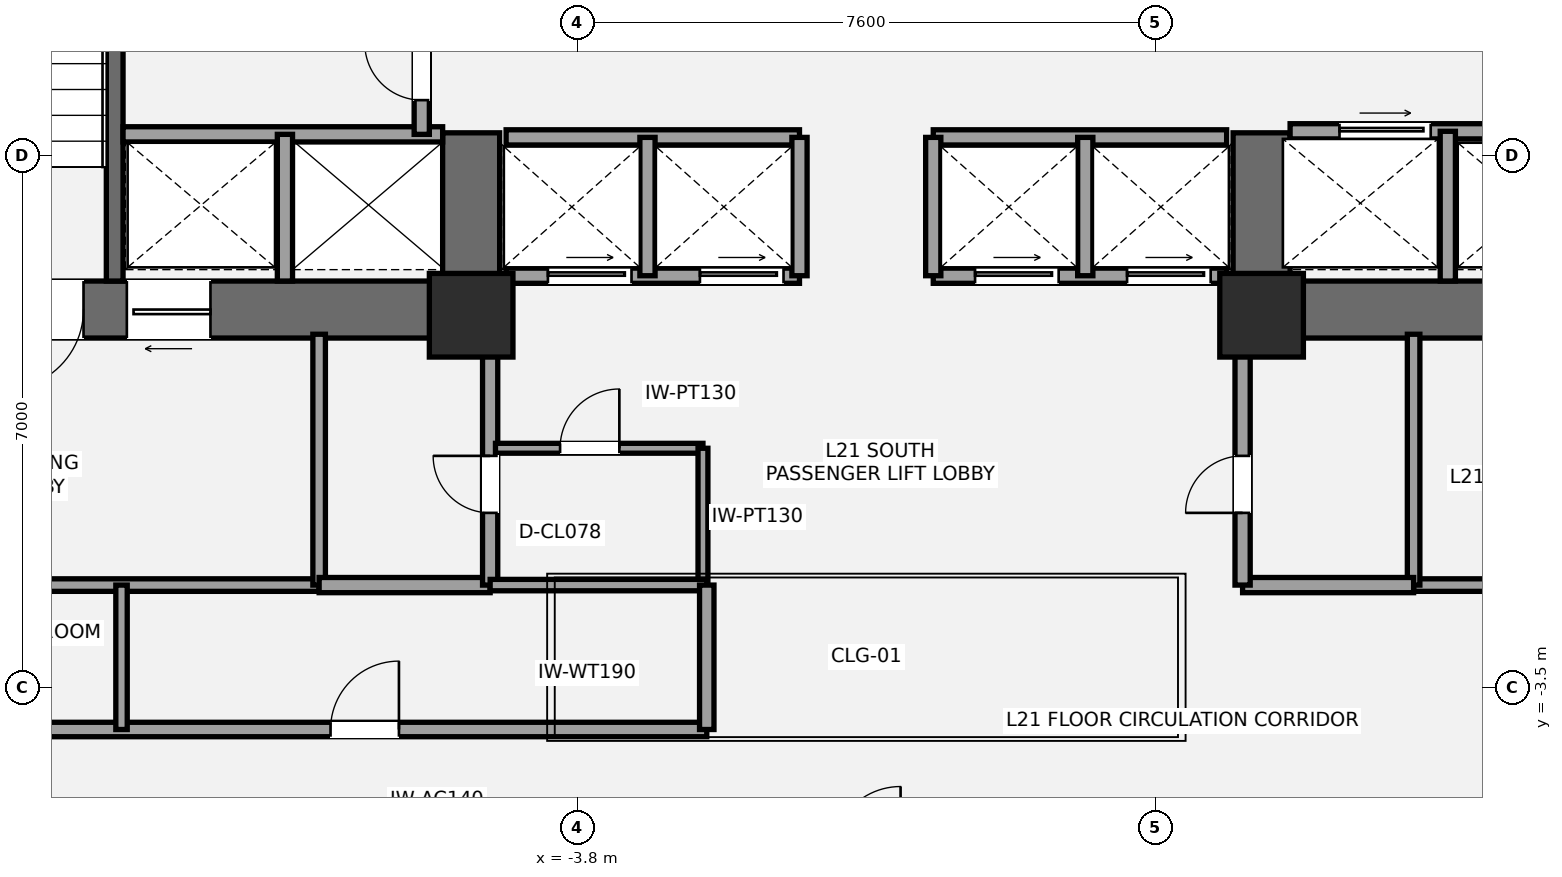
"""IFC4 building model, lengths in metres.
Left out: names, types, materials, properties, quantities, classifications, styles, units other than length and angle.
Written with IfcOpenShell. Run it as: python <this file> out.ifc"""

import sys

from ifc_helpers import new_model, si_unit, direction, frame, frame_2d, origin, origin_2d, place, context, subcontext, project, spatial, rectangle, extrude, element, fill, save


model = new_model("IFC4")
c1 = context("Model", 3, precision=1e-05, world=origin(), true_north=direction((0.0, 1.0)))
c2 = subcontext(c1, "Body", "Model", "MODEL_VIEW")
j1 = project(units=[si_unit("LENGTHUNIT", "METRE"), si_unit("PLANEANGLEUNIT", "RADIAN")], contexts=[c1])
p1 = place(None, origin())
s1 = spatial("IfcSite", under=j1, at=p1, CompositionType="ELEMENT")
p2 = place(p1, origin())
s2 = spatial("IfcBuilding", under=s1, at=p2, CompositionType="ELEMENT")
p3 = place(p2, frame((0.0, 0.0, 81.9)))
s3 = spatial("IfcBuildingStorey", under=s2, at=p3, CompositionType="ELEMENT", Elevation=81.9)
p4 = place(p3, frame((-4.825, 1.475, 0.0), z_axis=(0.0, 0.0, 1.0), x_axis=(-1.0, 0.0, 0.0)))
e1 = element("IfcWall", 1, at=p4, inside=s3, PredefinedType="SHEAR", context=c2, shape_type="SweptSolid", body=[
    extrude(rectangle(XDim=9.075, YDim=0.75, at=frame_2d((4.538, 0.0))), origin(), (0.0, 0.0, 1.0), 4.2),
])
p5 = place(p4, frame((5.475, 0.0, 0.0)))
e2 = element("IfcOpeningElement", 2, at=p5, cuts=e1, PredefinedType="OPENING", context=c2, shape_type="SweptSolid", body=[
    extrude(rectangle(XDim=1.05, YDim=2.15, at=frame_2d((0.525, 1.075))), frame((0.0, 0.385, 0.0), z_axis=(0.0, -1.0, 0.0), x_axis=(1.0, 0.0, 0.0)), (0.0, 0.0, 1.0), 0.77),
])
p6 = place(p4, frame((3.805, 0.0, 0.0)))
e3 = element("IfcOpeningElement", 3, at=p6, cuts=e1, PredefinedType="OPENING", context=c2, shape_type="SweptSolid", body=[
    extrude(rectangle(XDim=1.1, YDim=2.2, at=frame_2d((0.55, 1.1))), frame((0.0, 0.385, 0.0), z_axis=(0.0, -1.0, 0.0), x_axis=(1.0, 0.0, 0.0)), (0.0, 0.0, 1.0), 0.77),
])
p7 = place(p3, frame((-5.2, 1.1, 0.0), z_axis=(0.0, 0.0, 1.0), x_axis=(0.0, 1.0, 0.0)))
e4 = element("IfcWall", 4, at=p7, inside=s3, PredefinedType="SHEAR", context=c2, shape_type="SweptSolid", body=[
    extrude(rectangle(XDim=2.7, YDim=0.75, at=frame_2d((1.35, 0.0))), origin(), (0.0, 0.0, 1.0), 4.2),
])
p8 = place(p3, frame((-9.89, 1.85, 0.0), z_axis=(0.0, 0.0, 1.0), x_axis=(0.0, 1.0, 0.0)))
e5 = element("IfcWall", 5, at=p8, inside=s3, PredefinedType="SHEAR", context=c2, shape_type="SweptSolid", body=[
    extrude(rectangle(XDim=7.15, YDim=0.22, at=frame_2d((3.575, 0.0))), origin(), (0.0, 0.0, 1.0), 4.2),
])
p9 = place(p3, frame((13.9, 1.475, 0.0), z_axis=(0.0, 0.0, 1.0), x_axis=(-1.0, 0.0, 0.0)))
e6 = element("IfcWall", 6, at=p9, inside=s3, PredefinedType="SHEAR", context=c2, shape_type="SweptSolid", body=[
    extrude(rectangle(XDim=9.075, YDim=0.75, at=frame_2d((4.538, 0.0))), origin(), (0.0, 0.0, 1.0), 4.2),
])
p10 = place(p9, frame((2.55, 0.0, 0.0)))
e7 = element("IfcOpeningElement", 7, at=p10, cuts=e6, PredefinedType="OPENING", context=c2, shape_type="SweptSolid", body=[
    extrude(rectangle(XDim=1.05, YDim=2.15, at=frame_2d((0.525, 1.075))), frame((0.0, 0.385, 0.0), z_axis=(0.0, -1.0, 0.0), x_axis=(1.0, 0.0, 0.0)), (0.0, 0.0, 1.0), 0.77),
])
p11 = place(p9, frame((4.55, 0.0, 0.0)))
e8 = element("IfcOpeningElement", 8, at=p11, cuts=e6, PredefinedType="OPENING", context=c2, shape_type="SweptSolid", body=[
    extrude(rectangle(XDim=1.1, YDim=2.2, at=frame_2d((0.55, 1.1))), frame((0.0, 0.385, 0.0), z_axis=(0.0, -1.0, 0.0), x_axis=(1.0, 0.0, 0.0)), (0.0, 0.0, 1.0), 0.77),
])
p12 = place(p3, frame((5.2, 1.1, 0.0), z_axis=(0.0, 0.0, 1.0), x_axis=(0.0, 1.0, 0.0)))
e9 = element("IfcWall", 9, at=p12, inside=s3, PredefinedType="SHEAR", context=c2, shape_type="SweptSolid", body=[
    extrude(rectangle(XDim=2.7, YDim=0.75, at=frame_2d((1.35, 0.0))), origin(), (0.0, 0.0, 1.0), 4.2),
])
for number, where, z_axis, x_axis in (
    (10, (-5.2, 1.4, 0.0), (0.0, 0.0, 1.0), (1.0, 0.0, 0.0)),
    (11, (5.2, 1.4, 0.0), (0.0, 0.0, 1.0), (1.0, 0.0, 0.0)),
):
    element("IfcColumn", number, at=place(p3, frame(where, z_axis=z_axis, x_axis=x_axis)), inside=s3, PredefinedType="COLUMN", context=c2, shape_type="SweptSolid", body=[
        extrude(rectangle(XDim=1.1, YDim=1.1, at=origin_2d()), origin(), (0.0, 0.0, 1.0), 4.2),
    ])
p13 = place(p3, frame((-13.45, -2.15, 0.0), z_axis=(0.0, 0.0, 1.0), x_axis=(1.0, 0.0, 0.0)))
e12 = element("IfcWall", 12, at=p13, inside=s3, PredefinedType="PARTITIONING", context=c2, shape_type="SweptSolid", body=[
    extrude(rectangle(XDim=6.25, YDim=0.165, at=frame_2d((3.125, 0.0))), origin(), (0.0, 0.0, 1.0), 4.01),
])
p14 = place(p3, frame((-7.2, -2.15, 0.0), z_axis=(0.0, 0.0, 1.0), x_axis=(0.0, 1.0, 0.0)))
e13 = element("IfcWall", 13, at=p14, inside=s3, PredefinedType="PARTITIONING", context=c2, shape_type="SweptSolid", body=[
    extrude(rectangle(XDim=3.3, YDim=0.165, at=frame_2d((1.65, 0.0))), origin(), (0.0, 0.0, 1.0), 3.463),
])
p15 = place(p3, frame((-7.2, -2.15, 0.0), z_axis=(0.0, 0.0, 1.0), x_axis=(1.0, 0.0, 0.0)))
e14 = element("IfcWall", 14, at=p15, inside=s3, PredefinedType="SOLIDWALL", context=c2, shape_type="SweptSolid", body=[
    extrude(rectangle(XDim=2.25, YDim=0.2, at=frame_2d((1.125, 0.0))), origin(), (0.0, 0.0, 1.0), 4.01),
])
p16 = place(p3, frame((-4.95, -2.15, 0.0), z_axis=(0.0, 0.0, 1.0), x_axis=(0.0, 1.0, 0.0)))
e15 = element("IfcWall", 15, at=p16, inside=s3, PredefinedType="SOLIDWALL", context=c2, shape_type="SweptSolid", body=[
    extrude(rectangle(XDim=3.3, YDim=0.2, at=frame_2d((1.65, 0.0))), origin(), (0.0, 0.0, 1.0), 4.01),
])
p17 = place(p16, frame((0.95, 0.0, 0.0)))
e16 = element("IfcOpeningElement", 16, at=p17, cuts=e15, PredefinedType="OPENING", context=c2, shape_type="SweptSolid", body=[
    extrude(rectangle(XDim=0.75, YDim=2.1, at=frame_2d((0.375, 1.05))), frame((0.0, 0.11, 0.0), z_axis=(0.0, -1.0, 0.0), x_axis=(1.0, 0.0, 0.0)), (0.0, 0.0, 1.0), 0.22),
])
p18 = place(p3, frame((7.2, -2.15, 0.0), z_axis=(0.0, 0.0, 1.0), x_axis=(1.0, 0.0, 0.0)))
e17 = element("IfcWall", 17, at=p18, inside=s3, PredefinedType="PARTITIONING", context=c2, shape_type="SweptSolid", body=[
    extrude(rectangle(XDim=6.25, YDim=0.165, at=frame_2d((3.125, 0.0))), origin(), (0.0, 0.0, 1.0), 4.01),
])
p19 = place(p3, frame((7.2, -2.15, 0.0), z_axis=(0.0, 0.0, 1.0), x_axis=(0.0, 1.0, 0.0)))
e18 = element("IfcWall", 18, at=p19, inside=s3, PredefinedType="PARTITIONING", context=c2, shape_type="SweptSolid", body=[
    extrude(rectangle(XDim=3.3, YDim=0.165, at=frame_2d((1.65, 0.0))), origin(), (0.0, 0.0, 1.0), 3.463),
])
p20 = place(p3, frame((4.95, -2.15, 0.0), z_axis=(0.0, 0.0, 1.0), x_axis=(1.0, 0.0, 0.0)))
e19 = element("IfcWall", 19, at=p20, inside=s3, PredefinedType="SOLIDWALL", context=c2, shape_type="SweptSolid", body=[
    extrude(rectangle(XDim=2.25, YDim=0.2, at=frame_2d((1.125, 0.0))), origin(), (0.0, 0.0, 1.0), 4.01),
])
p21 = place(p3, frame((4.95, -2.15, 0.0), z_axis=(0.0, 0.0, 1.0), x_axis=(0.0, 1.0, 0.0)))
e20 = element("IfcWall", 20, at=p21, inside=s3, PredefinedType="SOLIDWALL", context=c2, shape_type="SweptSolid", body=[
    extrude(rectangle(XDim=3.3, YDim=0.2, at=frame_2d((1.65, 0.0))), origin(), (0.0, 0.0, 1.0), 3.463),
])
p22 = place(p21, frame((0.95, 0.0, 0.0)))
e21 = element("IfcOpeningElement", 21, at=p22, cuts=e20, PredefinedType="OPENING", context=c2, shape_type="SweptSolid", body=[
    extrude(rectangle(XDim=0.75, YDim=2.1, at=frame_2d((0.375, 1.05))), frame((0.0, 0.11, 0.0), z_axis=(0.0, -1.0, 0.0), x_axis=(1.0, 0.0, 0.0)), (0.0, 0.0, 1.0), 0.22),
])
p23 = place(p3, frame((-4.88, -0.35, 0.0), z_axis=(0.0, 0.0, 1.0), x_axis=(1.0, 0.0, 0.0)))
e22 = element("IfcWall", 22, at=p23, inside=s3, PredefinedType="PARTITIONING", context=c2, shape_type="SweptSolid", body=[
    extrude(rectangle(XDim=2.73, YDim=0.13, at=frame_2d((1.365, 0.0))), origin(), (0.0, 0.0, 1.0), 3.463),
])
p24 = place(p23, frame((0.85, 0.0, 0.0)))
e23 = element("IfcOpeningElement", 23, at=p24, cuts=e22, PredefinedType="OPENING", context=c2, shape_type="SweptSolid", body=[
    extrude(rectangle(XDim=0.78, YDim=2.1, at=frame_2d((0.39, 1.05))), frame((0.0, 0.075, 0.0), z_axis=(0.0, -1.0, 0.0), x_axis=(1.0, 0.0, 0.0)), (0.0, 0.0, 1.0), 0.15),
])
p25 = place(p3, frame((-2.15, -2.15, 0.0), z_axis=(0.0, 0.0, 1.0), x_axis=(0.0, 1.0, 0.0)))
e24 = element("IfcWall", 24, at=p25, inside=s3, PredefinedType="PARTITIONING", context=c2, shape_type="SweptSolid", body=[
    extrude(rectangle(XDim=1.8, YDim=0.13, at=frame_2d((0.9, 0.0))), origin(), (0.0, 0.0, 1.0), 4.01),
])
p26 = place(p3, frame((-9.78, 3.78, 0.0), z_axis=(0.0, 0.0, 1.0), x_axis=(1.0, 0.0, 0.0)))
e25 = element("IfcWall", 25, at=p26, inside=s3, PredefinedType="SOLIDWALL", context=c2, shape_type="SweptSolid", body=[
    extrude(rectangle(XDim=4.205, YDim=0.2, at=frame_2d((2.103, 0.0))), origin(), (0.0, 0.0, 1.0), 4.01),
])
p27 = place(p3, frame((-7.65, 1.85, 0.0), z_axis=(0.0, 0.0, 1.0), x_axis=(0.0, 1.0, 0.0)))
e26 = element("IfcWall", 26, at=p27, inside=s3, PredefinedType="SOLIDWALL", context=c2, shape_type="SweptSolid", body=[
    extrude(rectangle(XDim=1.93, YDim=0.2, at=frame_2d((0.965, 0.0))), origin(), (0.0, 0.0, 1.0), 4.01),
])
p28 = place(p3, frame((-5.85, 3.78, 0.0), z_axis=(0.0, 0.0, 1.0), x_axis=(0.0, 1.0, 0.0)))
e27 = element("IfcWall", 27, at=p28, inside=s3, PredefinedType="SOLIDWALL", context=c2, shape_type="SweptSolid", body=[
    extrude(rectangle(XDim=1.69, YDim=0.2, at=frame_2d((0.845, 0.0))), origin(), (0.0, 0.0, 1.0), 4.01),
])
p29 = place(p28, frame((0.45, 0.0, 0.0)))
e28 = element("IfcOpeningElement", 28, at=p29, cuts=e27, PredefinedType="OPENING", context=c2, shape_type="SweptSolid", body=[
    extrude(rectangle(XDim=0.75, YDim=2.1, at=frame_2d((0.375, 1.05))), frame((0.0, 0.11, 0.0), z_axis=(0.0, -1.0, 0.0), x_axis=(1.0, 0.0, 0.0)), (0.0, 0.0, 1.0), 0.22),
])
p30 = place(p3, frame((5.575, 3.82, 0.0), z_axis=(0.0, 0.0, 1.0), x_axis=(1.0, 0.0, 0.0)))
e29 = element("IfcWall", 29, at=p30, inside=s3, PredefinedType="SOLIDWALL", context=c2, shape_type="SweptSolid", body=[
    extrude(rectangle(XDim=4.205, YDim=0.2, at=frame_2d((2.103, 0.0))), origin(), (0.0, 0.0, 1.0), 4.01),
])
p31 = place(p30, frame((0.65, 0.0, 0.0)))
e30 = element("IfcOpeningElement", 30, at=p31, cuts=e29, PredefinedType="OPENING", context=c2, shape_type="SweptSolid", body=[
    extrude(rectangle(XDim=1.2, YDim=2.2, at=frame_2d((0.6, 1.1))), frame((0.0, 0.11, 0.0), z_axis=(0.0, -1.0, 0.0), x_axis=(1.0, 0.0, 0.0)), (0.0, 0.0, 1.0), 0.22),
])
p32 = place(p3, frame((7.65, 1.85, 0.0), z_axis=(0.0, 0.0, 1.0), x_axis=(0.0, 1.0, 0.0)))
e31 = element("IfcWall", 31, at=p32, inside=s3, PredefinedType="SOLIDWALL", context=c2, shape_type="SweptSolid", body=[
    extrude(rectangle(XDim=1.97, YDim=0.2, at=frame_2d((0.985, 0.0))), origin(), (0.0, 0.0, 1.0), 4.01),
])
p33 = place(p3, frame((-4.74, 1.92, 0.0), z_axis=(0.0, 0.0, 1.0), x_axis=(1.0, 0.0, 0.0)))
e32 = element("IfcWall", 32, at=p33, inside=s3, PredefinedType="SOLIDWALL", context=c2, shape_type="SweptSolid", body=[
    extrude(rectangle(XDim=3.86, YDim=0.2, at=frame_2d((1.93, 0.0))), origin(), (0.0, 0.0, 1.0), 3.0),
])
p34 = place(p33, frame((0.55, 0.0, 0.0)))
e33 = element("IfcOpeningElement", 33, at=p34, cuts=e32, PredefinedType="OPENING", context=c2, shape_type="SweptSolid", body=[
    extrude(rectangle(XDim=1.1, YDim=2.2, at=frame_2d((0.55, 1.1))), frame((0.0, 0.11, 0.0), z_axis=(0.0, -1.0, 0.0), x_axis=(1.0, 0.0, 0.0)), (0.0, 0.0, 1.0), 0.22),
])
p35 = place(p33, frame((2.55, 0.0, 0.0)))
e34 = element("IfcOpeningElement", 34, at=p35, cuts=e32, PredefinedType="OPENING", context=c2, shape_type="SweptSolid", body=[
    extrude(rectangle(XDim=1.1, YDim=2.2, at=frame_2d((0.55, 1.1))), frame((0.0, 0.11, 0.0), z_axis=(0.0, -1.0, 0.0), x_axis=(1.0, 0.0, 0.0)), (0.0, 0.0, 1.0), 0.22),
])
p36 = place(p3, frame((0.88, 1.92, 0.0), z_axis=(0.0, 0.0, 1.0), x_axis=(1.0, 0.0, 0.0)))
e35 = element("IfcWall", 35, at=p36, inside=s3, PredefinedType="SOLIDWALL", context=c2, shape_type="SweptSolid", body=[
    extrude(rectangle(XDim=3.86, YDim=0.2, at=frame_2d((1.93, 0.0))), origin(), (0.0, 0.0, 1.0), 3.0),
])
p37 = place(p36, frame((0.55, 0.0, 0.0)))
e36 = element("IfcOpeningElement", 36, at=p37, cuts=e35, PredefinedType="OPENING", context=c2, shape_type="SweptSolid", body=[
    extrude(rectangle(XDim=1.1, YDim=2.2, at=frame_2d((0.55, 1.1))), frame((0.0, 0.11, 0.0), z_axis=(0.0, -1.0, 0.0), x_axis=(1.0, 0.0, 0.0)), (0.0, 0.0, 1.0), 0.22),
])
p38 = place(p36, frame((2.55, 0.0, 0.0)))
e37 = element("IfcOpeningElement", 37, at=p38, cuts=e35, PredefinedType="OPENING", context=c2, shape_type="SweptSolid", body=[
    extrude(rectangle(XDim=1.1, YDim=2.2, at=frame_2d((0.55, 1.1))), frame((0.0, 0.11, 0.0), z_axis=(0.0, -1.0, 0.0), x_axis=(1.0, 0.0, 0.0)), (0.0, 0.0, 1.0), 0.22),
])
for number, where, z_axis, x_axis in (
    (38, (-4.74, 3.74, 0.0), (0.0, 0.0, 1.0), (1.0, 0.0, 0.0)),
    (39, (0.88, 3.74, 0.0), (0.0, 0.0, 1.0), (1.0, 0.0, 0.0)),
):
    element("IfcWall", number, at=place(p3, frame(where, z_axis=z_axis, x_axis=x_axis)), inside=s3, PredefinedType="SOLIDWALL", context=c2, shape_type="SweptSolid", body=[
        extrude(rectangle(XDim=3.86, YDim=0.2, at=frame_2d((1.93, 0.0))), origin(), (0.0, 0.0, 1.0), 4.01),
    ])
for number, where, z_axis, x_axis in (
    (40, (-2.88, 1.92, 0.0), (0.0, 0.0, 1.0), (0.0, 1.0, 0.0)),
    (41, (2.88, 1.92, 0.0), (0.0, 0.0, 1.0), (0.0, 1.0, 0.0)),
    (42, (-0.88, 1.92, 0.0), (0.0, 0.0, 1.0), (0.0, 1.0, 0.0)),
    (43, (0.88, 1.92, 0.0), (0.0, 0.0, 1.0), (0.0, 1.0, 0.0)),
):
    element("IfcWall", number, at=place(p3, frame(where, z_axis=z_axis, x_axis=x_axis)), inside=s3, PredefinedType="SOLIDWALL", context=c2, shape_type="SweptSolid", body=[
        extrude(rectangle(XDim=1.82, YDim=0.2, at=frame_2d((0.91, 0.0))), origin(), (0.0, 0.0, 1.0), 4.01),
    ])
p39 = place(p3, frame((-13.45, -4.05, 0.0), z_axis=(0.0, 0.0, 1.0), x_axis=(1.0, 0.0, 0.0)))
e44 = element("IfcWall", 44, at=p39, inside=s3, PredefinedType="PLUMBINGWALL", context=c2, shape_type="SweptSolid", body=[
    extrude(rectangle(XDim=11.35, YDim=0.19, at=frame_2d((5.675, 0.0))), origin(), (0.0, 0.0, 1.0), 3.463),
])
p40 = place(p39, frame((1.25, 0.0, 0.0)))
e45 = element("IfcOpeningElement", 45, at=p40, cuts=e44, PredefinedType="OPENING", context=c2, shape_type="SweptSolid", body=[
    extrude(rectangle(XDim=0.95, YDim=2.15, at=frame_2d((0.475, 1.075))), frame((0.0, 0.105, 0.0), z_axis=(0.0, -1.0, 0.0), x_axis=(1.0, 0.0, 0.0)), (0.0, 0.0, 1.0), 0.21),
])
p41 = place(p39, frame((6.4, 0.0, 0.0)))
e46 = element("IfcOpeningElement", 46, at=p41, cuts=e44, PredefinedType="OPENING", context=c2, shape_type="SweptSolid", body=[
    extrude(rectangle(XDim=0.9, YDim=2.1, at=frame_2d((0.45, 1.05))), frame((0.0, 0.105, 0.0), z_axis=(0.0, -1.0, 0.0), x_axis=(1.0, 0.0, 0.0)), (0.0, 0.0, 1.0), 0.21),
])
p42 = place(p3, frame((-4.95, -2.15, 0.0), z_axis=(0.0, 0.0, 1.0), x_axis=(1.0, 0.0, 0.0)))
e47 = element("IfcWall", 47, at=p42, inside=s3, PredefinedType="PLUMBINGWALL", context=c2, shape_type="SweptSolid", body=[
    extrude(rectangle(XDim=2.85, YDim=0.15, at=frame_2d((1.425, 0.0))), origin(), (0.0, 0.0, 1.0), 4.01),
])
p43 = place(p3, frame((-2.1, -4.05, 0.0), z_axis=(0.0, 0.0, 1.0), x_axis=(0.0, 1.0, 0.0)))
e48 = element("IfcWall", 48, at=p43, inside=s3, PredefinedType="PLUMBINGWALL", context=c2, shape_type="SweptSolid", body=[
    extrude(rectangle(XDim=1.9, YDim=0.19, at=frame_2d((0.95, 0.0))), origin(), (0.0, 0.0, 1.0), 3.463),
])
p44 = place(p3, frame((-9.8, -4.05, 0.0), z_axis=(0.0, 0.0, 1.0), x_axis=(0.0, 1.0, 0.0)))
e49 = element("IfcWall", 49, at=p44, inside=s3, PredefinedType="PLUMBINGWALL", context=c2, shape_type="SweptSolid", body=[
    extrude(rectangle(XDim=1.9, YDim=0.15, at=frame_2d((0.95, 0.0))), origin(), (0.0, 0.0, 1.0), 4.01),
])
p45 = place(p5, origin())
e50 = element("IfcDoor", 50, at=p45, inside=s3, OperationType="SINGLE_SWING_RIGHT", PredefinedType="DOOR", context=c2, shape_type="SweptSolid", body=[
    extrude(rectangle(XDim=1.05, YDim=2.15, at=frame_2d((0.525, 1.075))), frame((0.0, 0.025, 0.0), z_axis=(0.0, -1.0, 0.0), x_axis=(1.0, 0.0, 0.0)), (0.0, 0.0, 1.0), 0.05),
])
fill(e2, e50)
p46 = place(p17, origin())
e51 = element("IfcDoor", 51, at=p46, inside=s3, OperationType="SINGLE_SWING_RIGHT", PredefinedType="DOOR", context=c2, shape_type="SweptSolid", body=[
    extrude(rectangle(XDim=0.75, YDim=2.1, at=frame_2d((0.375, 1.05))), frame((0.0, 0.025, 0.0), z_axis=(0.0, -1.0, 0.0), x_axis=(1.0, 0.0, 0.0)), (0.0, 0.0, 1.0), 0.05),
])
fill(e16, e51)
p47 = place(p22, origin())
e52 = element("IfcDoor", 52, at=p47, inside=s3, OperationType="SINGLE_SWING_LEFT", PredefinedType="DOOR", context=c2, shape_type="SweptSolid", body=[
    extrude(rectangle(XDim=0.75, YDim=2.1, at=frame_2d((0.375, 1.05))), frame((0.0, 0.025, 0.0), z_axis=(0.0, -1.0, 0.0), x_axis=(1.0, 0.0, 0.0)), (0.0, 0.0, 1.0), 0.05),
])
fill(e21, e52)
p48 = place(p24, origin())
e53 = element("IfcDoor", 53, at=p48, inside=s3, OperationType="SINGLE_SWING_RIGHT", PredefinedType="DOOR", context=c2, shape_type="SweptSolid", body=[
    extrude(rectangle(XDim=0.78, YDim=2.1, at=frame_2d((0.39, 1.05))), frame((0.0, 0.025, 0.0), z_axis=(0.0, -1.0, 0.0), x_axis=(1.0, 0.0, 0.0)), (0.0, 0.0, 1.0), 0.05),
])
fill(e23, e53)
p49 = place(p6, origin())
e54 = element("IfcDoor", 54, at=p49, inside=s3, OperationType="SLIDING_TO_LEFT", PredefinedType="DOOR", context=c2, shape_type="SweptSolid", body=[
    extrude(rectangle(XDim=1.1, YDim=2.2, at=frame_2d((0.55, 1.1))), frame((0.0, 0.025, 0.0), z_axis=(0.0, -1.0, 0.0), x_axis=(1.0, 0.0, 0.0)), (0.0, 0.0, 1.0), 0.05),
])
fill(e3, e54)
p50 = place(p29, origin())
e55 = element("IfcDoor", 55, at=p50, inside=s3, OperationType="SINGLE_SWING_RIGHT", PredefinedType="DOOR", context=c2, shape_type="SweptSolid", body=[
    extrude(rectangle(XDim=0.75, YDim=2.1, at=frame_2d((0.375, 1.05))), frame((0.0, 0.025, 0.0), z_axis=(0.0, -1.0, 0.0), x_axis=(1.0, 0.0, 0.0)), (0.0, 0.0, 1.0), 0.05),
])
fill(e28, e55)
p51 = place(p31, origin())
e56 = element("IfcDoor", 56, at=p51, inside=s3, OperationType="SLIDING_TO_RIGHT", PredefinedType="DOOR", context=c2, shape_type="SweptSolid", body=[
    extrude(rectangle(XDim=1.2, YDim=2.2, at=frame_2d((0.6, 1.1))), frame((0.0, 0.025, 0.0), z_axis=(0.0, -1.0, 0.0), x_axis=(1.0, 0.0, 0.0)), (0.0, 0.0, 1.0), 0.05),
])
fill(e30, e56)
p52 = place(p34, origin())
e57 = element("IfcDoor", 57, at=p52, inside=s3, OperationType="SLIDING_TO_LEFT", PredefinedType="DOOR", context=c2, shape_type="SweptSolid", body=[
    extrude(rectangle(XDim=1.1, YDim=2.2, at=frame_2d((0.55, 1.1))), frame((0.0, 0.025, 0.0), z_axis=(0.0, -1.0, 0.0), x_axis=(1.0, 0.0, 0.0)), (0.0, 0.0, 1.0), 0.05),
])
fill(e33, e57)
p53 = place(p35, origin())
e58 = element("IfcDoor", 58, at=p53, inside=s3, OperationType="SLIDING_TO_LEFT", PredefinedType="DOOR", context=c2, shape_type="SweptSolid", body=[
    extrude(rectangle(XDim=1.1, YDim=2.2, at=frame_2d((0.55, 1.1))), frame((0.0, 0.025, 0.0), z_axis=(0.0, -1.0, 0.0), x_axis=(1.0, 0.0, 0.0)), (0.0, 0.0, 1.0), 0.05),
])
fill(e34, e58)
p54 = place(p37, origin())
e59 = element("IfcDoor", 59, at=p54, inside=s3, OperationType="SLIDING_TO_LEFT", PredefinedType="DOOR", context=c2, shape_type="SweptSolid", body=[
    extrude(rectangle(XDim=1.1, YDim=2.2, at=frame_2d((0.55, 1.1))), frame((0.0, 0.025, 0.0), z_axis=(0.0, -1.0, 0.0), x_axis=(1.0, 0.0, 0.0)), (0.0, 0.0, 1.0), 0.05),
])
fill(e36, e59)
p55 = place(p38, origin())
e60 = element("IfcDoor", 60, at=p55, inside=s3, OperationType="SLIDING_TO_LEFT", PredefinedType="DOOR", context=c2, shape_type="SweptSolid", body=[
    extrude(rectangle(XDim=1.1, YDim=2.2, at=frame_2d((0.55, 1.1))), frame((0.0, 0.025, 0.0), z_axis=(0.0, -1.0, 0.0), x_axis=(1.0, 0.0, 0.0)), (0.0, 0.0, 1.0), 0.05),
])
fill(e37, e60)
p56 = place(p41, origin())
e61 = element("IfcDoor", 61, at=p56, inside=s3, OperationType="SINGLE_SWING_RIGHT", PredefinedType="DOOR", context=c2, shape_type="SweptSolid", body=[
    extrude(rectangle(XDim=0.9, YDim=2.1, at=frame_2d((0.45, 1.05))), frame((0.0, 0.025, 0.0), z_axis=(0.0, -1.0, 0.0), x_axis=(1.0, 0.0, 0.0)), (0.0, 0.0, 1.0), 0.05),
])
fill(e46, e61)
save(model, sys.argv[1])
